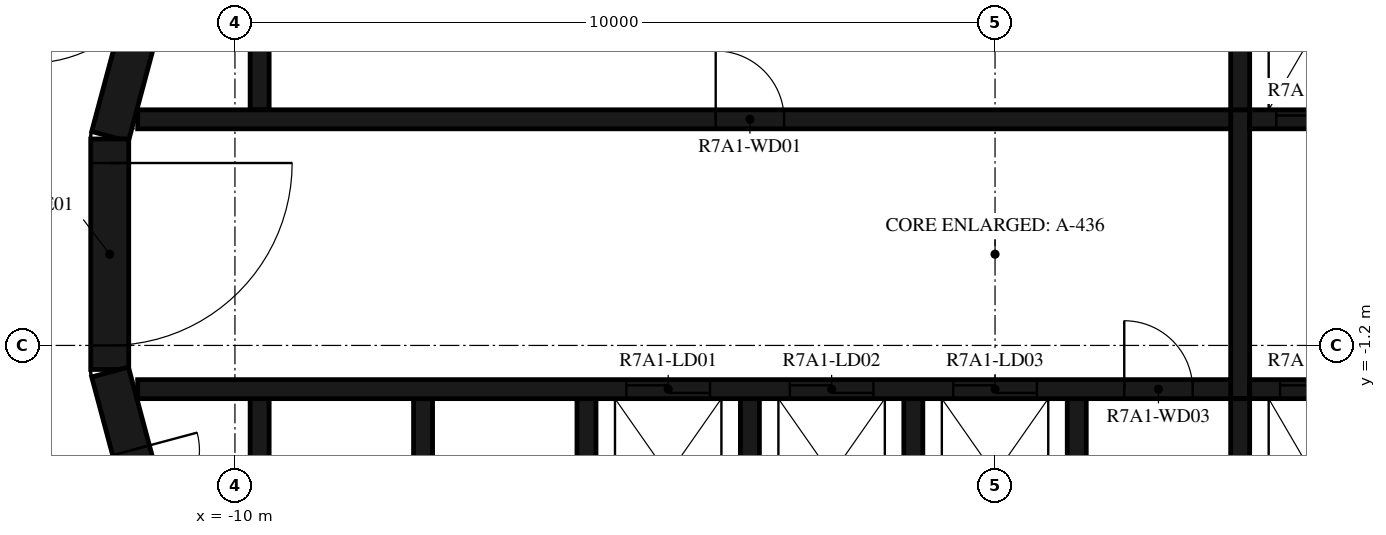
"""IFC4 building model, lengths in metres.
Left out: names, types, materials, properties, quantities, classifications, styles, units other than length and angle.
Written with IfcOpenShell. Run it as: python <this file> out.ifc"""

import sys

from ifc_helpers import new_model, si_unit, direction, frame, frame_2d, origin, place, context, subcontext, project, spatial, polyline, rectangle, outline, extrude, element, fill, save


model = new_model("IFC4")
c1 = context("Model", 3, precision=1e-05, world=origin(), true_north=direction((0.0, 1.0)))
c2 = subcontext(c1, "Body", "Model", "MODEL_VIEW")
j1 = project(units=[si_unit("LENGTHUNIT", "METRE"), si_unit("PLANEANGLEUNIT", "RADIAN")], contexts=[c1])
p1 = place(None, origin())
s1 = spatial("IfcSite", under=j1, at=p1, CompositionType="ELEMENT")
p2 = place(p1, origin())
s2 = spatial("IfcBuilding", under=s1, at=p2, CompositionType="ELEMENT")
p3 = place(p2, frame((0.0, 0.0, 266.9)))
s3 = spatial("IfcBuildingStorey", under=s2, at=p3, CompositionType="ELEMENT", Elevation=266.9)
p4 = place(p3, frame((-10.858, 4.479, 0.0), z_axis=(0.0, 0.0, 1.0), x_axis=(-0.258734743916, -0.965948410781, 0.0)))
e1 = element("IfcWall", 1, at=p4, inside=s3, PredefinedType="SHEAR", context=c2, shape_type="SweptSolid", body=[
    extrude(rectangle(XDim=3.033, YDim=0.5, at=frame_2d((1.516, 0.0))), origin(), (0.0, 0.0, 1.0), 3.12),
])
p5 = place(p3, frame((-11.647, 1.516, 0.0), z_axis=(0.0, 0.0, 1.0), x_axis=(0.0, -1.0, 0.0)))
e2 = element("IfcWall", 2, at=p5, inside=s3, PredefinedType="SHEAR", context=c2, shape_type="SweptSolid", body=[
    extrude(rectangle(XDim=3.033, YDim=0.5, at=frame_2d((1.516, 0.0))), origin(), (0.0, 0.0, 1.0), 3.12),
])
p6 = place(p5, frame((0.316, 0.0, 0.0)))
e3 = element("IfcOpeningElement", 3, at=p6, cuts=e2, PredefinedType="OPENING", context=c2, shape_type="SweptSolid", body=[
    extrude(rectangle(XDim=2.4, YDim=2.1, at=frame_2d((1.2, 1.05))), frame((0.0, 0.26, 0.0), z_axis=(0.0, -1.0, 0.0), x_axis=(1.0, 0.0, 0.0)), (0.0, 0.0, 1.0), 0.52),
])
p7 = place(p3, frame((-11.643, -1.55, 0.0), z_axis=(0.0, 0.0, 1.0), x_axis=(0.258734743916, -0.965948410781, 0.0)))
e4 = element("IfcWall", 4, at=p7, inside=s3, PredefinedType="SHEAR", context=c2, shape_type="SweptSolid", body=[
    extrude(rectangle(XDim=3.033, YDim=0.5, at=frame_2d((1.516, 0.0))), origin(), (0.0, 0.0, 1.0), 3.12),
])
p8 = place(p7, frame((1.066, 0.0, 0.0)))
e5 = element("IfcOpeningElement", 5, at=p8, cuts=e4, PredefinedType="OPENING", context=c2, shape_type="SweptSolid", body=[
    extrude(rectangle(XDim=0.9, YDim=2.1, at=frame_2d((0.45, 1.05))), frame((0.0, 0.26, 0.0), z_axis=(0.0, -1.0, 0.0), x_axis=(1.0, 0.0, 0.0)), (0.0, 0.0, 1.0), 0.52),
])
p9 = place(p3, origin())
e6 = element("IfcWall", 6, at=p9, inside=s3, PredefinedType="SHEAR", context=c2, shape_type="SweptSolid", body=[
    extrude(outline(polyline([(-9.8, 1.9), (-9.55, 1.9), (-9.55, 4.8), (3.1, 4.8), (3.1, 1.9), (3.35, 1.9), (3.35, 4.8), (5.25, 4.8), (5.25, 1.9), (5.5, 1.9), (5.5, 4.8), (7.4, 4.8), (7.4, 1.9), (7.65, 1.9), (7.65, 4.8), (9.55, 4.8), (9.55, 1.9), (9.8, 1.9), (9.8, 4.8), (9.8, 5.05), (-9.8, 5.05), (-9.8, 4.8), (-9.8, 1.9)])), origin(), (0.0, 0.0, 1.0), 3.12),
])
p10 = place(p3, origin())
e7 = element("IfcWall", 7, at=p10, inside=s3, PredefinedType="SHEAR", context=c2, shape_type="SweptSolid", body=[
    extrude(outline(polyline([(9.8, -5.05), (9.8, -4.8), (9.8, -1.9), (9.55, -1.9), (9.55, -4.8), (7.65, -4.8), (7.65, -1.9), (7.4, -1.9), (7.4, -4.8), (5.5, -4.8), (5.5, -1.9), (5.25, -1.9), (5.25, -4.8), (3.35, -4.8), (3.35, -1.9), (3.1, -1.9), (3.1, -4.8), (1.2, -4.8), (1.2, -1.9), (0.95, -1.9), (0.95, -4.8), (-0.95, -4.8), (-0.95, -1.9), (-1.2, -1.9), (-1.2, -4.8), (-3.1, -4.8), (-3.1, -1.9), (-3.35, -1.9), (-3.35, -4.8), (-5.25, -4.8), (-5.25, -1.9), (-5.5, -1.9), (-5.5, -4.8), (-7.4, -4.8), (-7.4, -1.9), (-7.65, -1.9), (-7.65, -4.8), (-9.55, -4.8), (-9.55, -1.9), (-9.8, -1.9), (-9.8, -4.8), (-9.8, -5.05), (9.8, -5.05)])), origin(), (0.0, 0.0, 1.0), 3.12),
])
p11 = place(p3, frame((-11.28, 1.775, 0.0), z_axis=(0.0, 0.0, 1.0), x_axis=(1.0, 0.0, 0.0)))
e8 = element("IfcWall", 8, at=p11, inside=s3, PredefinedType="SHEAR", context=c2, shape_type="SweptSolid", body=[
    extrude(rectangle(XDim=14.38, YDim=0.25, at=frame_2d((7.19, 0.0))), origin(), (0.0, 0.0, 1.0), 3.12),
])
p12 = place(p11, frame((7.605, 0.0, 0.0)))
e9 = element("IfcOpeningElement", 9, at=p12, cuts=e8, PredefinedType="OPENING", context=c2, shape_type="SweptSolid", body=[
    extrude(rectangle(XDim=0.9, YDim=2.1, at=frame_2d((0.45, 1.05))), frame((0.0, 0.135, 0.0), z_axis=(0.0, -1.0, 0.0), x_axis=(1.0, 0.0, 0.0)), (0.0, 0.0, 1.0), 0.27),
])
p13 = place(p3, frame((3.35, 1.775, 0.0), z_axis=(0.0, 0.0, 1.0), x_axis=(1.0, 0.0, 0.0)))
e10 = element("IfcWall", 10, at=p13, inside=s3, PredefinedType="SHEAR", context=c2, shape_type="SweptSolid", body=[
    extrude(rectangle(XDim=7.93, YDim=0.25, at=frame_2d((3.965, 0.0))), origin(), (0.0, 0.0, 1.0), 3.12),
])
p14 = place(p13, frame((0.35, 0.0, 0.0)))
e11 = element("IfcOpeningElement", 11, at=p14, cuts=e10, PredefinedType="OPENING", context=c2, shape_type="SweptSolid", body=[
    extrude(rectangle(XDim=1.2, YDim=2.4, at=frame_2d((0.6, 1.2))), frame((0.0, 0.135, 0.0), z_axis=(0.0, -1.0, 0.0), x_axis=(1.0, 0.0, 0.0)), (0.0, 0.0, 1.0), 0.27),
])
p15 = place(p13, frame((2.5, 0.0, 0.0)))
e12 = element("IfcOpeningElement", 12, at=p15, cuts=e10, PredefinedType="OPENING", context=c2, shape_type="SweptSolid", body=[
    extrude(rectangle(XDim=1.2, YDim=2.4, at=frame_2d((0.6, 1.2))), frame((0.0, 0.135, 0.0), z_axis=(0.0, -1.0, 0.0), x_axis=(1.0, 0.0, 0.0)), (0.0, 0.0, 1.0), 0.27),
])
p16 = place(p13, frame((4.8, 0.0, 0.0)))
e13 = element("IfcOpeningElement", 13, at=p16, cuts=e10, PredefinedType="OPENING", context=c2, shape_type="SweptSolid", body=[
    extrude(rectangle(XDim=0.9, YDim=2.1, at=frame_2d((0.45, 1.05))), frame((0.0, 0.135, 0.0), z_axis=(0.0, -1.0, 0.0), x_axis=(1.0, 0.0, 0.0)), (0.0, 0.0, 1.0), 0.27),
])
p17 = place(p3, frame((-11.28, -1.775, 0.0), z_axis=(0.0, 0.0, 1.0), x_axis=(1.0, 0.0, 0.0)))
e14 = element("IfcWall", 14, at=p17, inside=s3, PredefinedType="SHEAR", context=c2, shape_type="SweptSolid", body=[
    extrude(rectangle(XDim=14.38, YDim=0.25, at=frame_2d((7.19, 0.0))), origin(), (0.0, 0.0, 1.0), 3.12),
])
p18 = place(p17, frame((6.43, 0.0, 0.0)))
e15 = element("IfcOpeningElement", 15, at=p18, cuts=e14, PredefinedType="OPENING", context=c2, shape_type="SweptSolid", body=[
    extrude(rectangle(XDim=1.1, YDim=2.1, at=frame_2d((0.55, 1.05))), frame((0.0, 0.135, 0.0), z_axis=(0.0, -1.0, 0.0), x_axis=(1.0, 0.0, 0.0)), (0.0, 0.0, 1.0), 0.27),
])
p19 = place(p17, frame((8.58, 0.0, 0.0)))
e16 = element("IfcOpeningElement", 16, at=p19, cuts=e14, PredefinedType="OPENING", context=c2, shape_type="SweptSolid", body=[
    extrude(rectangle(XDim=1.1, YDim=2.1, at=frame_2d((0.55, 1.05))), frame((0.0, 0.135, 0.0), z_axis=(0.0, -1.0, 0.0), x_axis=(1.0, 0.0, 0.0)), (0.0, 0.0, 1.0), 0.27),
])
p20 = place(p17, frame((10.73, 0.0, 0.0)))
e17 = element("IfcOpeningElement", 17, at=p20, cuts=e14, PredefinedType="OPENING", context=c2, shape_type="SweptSolid", body=[
    extrude(rectangle(XDim=1.1, YDim=2.1, at=frame_2d((0.55, 1.05))), frame((0.0, 0.135, 0.0), z_axis=(0.0, -1.0, 0.0), x_axis=(1.0, 0.0, 0.0)), (0.0, 0.0, 1.0), 0.27),
])
p21 = place(p17, frame((12.98, 0.0, 0.0)))
e18 = element("IfcOpeningElement", 18, at=p21, cuts=e14, PredefinedType="OPENING", context=c2, shape_type="SweptSolid", body=[
    extrude(rectangle(XDim=0.9, YDim=2.1, at=frame_2d((0.45, 1.05))), frame((0.0, 0.135, 0.0), z_axis=(0.0, -1.0, 0.0), x_axis=(1.0, 0.0, 0.0)), (0.0, 0.0, 1.0), 0.27),
])
p22 = place(p3, frame((3.35, -1.775, 0.0), z_axis=(0.0, 0.0, 1.0), x_axis=(1.0, 0.0, 0.0)))
e19 = element("IfcWall", 19, at=p22, inside=s3, PredefinedType="SHEAR", context=c2, shape_type="SweptSolid", body=[
    extrude(rectangle(XDim=7.93, YDim=0.25, at=frame_2d((3.965, 0.0))), origin(), (0.0, 0.0, 1.0), 3.12),
])
p23 = place(p22, frame((0.4, 0.0, 0.0)))
e20 = element("IfcOpeningElement", 20, at=p23, cuts=e19, PredefinedType="OPENING", context=c2, shape_type="SweptSolid", body=[
    extrude(rectangle(XDim=1.1, YDim=2.4, at=frame_2d((0.55, 1.2))), frame((0.0, 0.135, 0.0), z_axis=(0.0, -1.0, 0.0), x_axis=(1.0, 0.0, 0.0)), (0.0, 0.0, 1.0), 0.27),
])
p24 = place(p22, frame((2.55, 0.0, 0.0)))
e21 = element("IfcOpeningElement", 21, at=p24, cuts=e19, PredefinedType="OPENING", context=c2, shape_type="SweptSolid", body=[
    extrude(rectangle(XDim=1.1, YDim=2.4, at=frame_2d((0.55, 1.2))), frame((0.0, 0.135, 0.0), z_axis=(0.0, -1.0, 0.0), x_axis=(1.0, 0.0, 0.0)), (0.0, 0.0, 1.0), 0.27),
])
p25 = place(p22, frame((4.7, 0.0, 0.0)))
e22 = element("IfcOpeningElement", 22, at=p25, cuts=e19, PredefinedType="OPENING", context=c2, shape_type="SweptSolid", body=[
    extrude(rectangle(XDim=1.1, YDim=2.4, at=frame_2d((0.55, 1.2))), frame((0.0, 0.135, 0.0), z_axis=(0.0, -1.0, 0.0), x_axis=(1.0, 0.0, 0.0)), (0.0, 0.0, 1.0), 0.27),
])
p26 = place(p3, frame((3.225, -1.9, 0.0), z_axis=(0.0, 0.0, 1.0), x_axis=(0.0, 1.0, 0.0)))
e23 = element("IfcWall", 23, at=p26, inside=s3, PredefinedType="SHEAR", context=c2, shape_type="SweptSolid", body=[
    extrude(rectangle(XDim=3.8, YDim=0.25, at=frame_2d((1.9, 0.0))), origin(), (0.0, 0.0, 1.0), 3.12),
])
p27 = place(p3, frame((-11.223, 8.154, 0.0), z_axis=(0.0, 0.0, 1.0), x_axis=(-0.358341090983, -0.93359073609, 0.0)))
e24 = element("IfcWall", 24, at=p27, inside=s3, PredefinedType="STANDARD", context=c2, shape_type="SweptSolid", body=[
    extrude(rectangle(XDim=7.181, YDim=0.2, at=frame_2d((3.59, 0.0))), origin(), (0.0, 0.0, 1.0), 3.12),
])
p28 = place(p27, frame((4.114, 0.0, 0.0)))
e25 = element("IfcOpeningElement", 25, at=p28, cuts=e24, PredefinedType="OPENING", context=c2, shape_type="SweptSolid", body=[
    extrude(rectangle(XDim=1.8, YDim=2.1, at=frame_2d((0.9, 1.05))), frame((0.0, 0.11, 0.0), z_axis=(0.0, -1.0, 0.0), x_axis=(1.0, 0.0, 0.0)), (0.0, 0.0, 1.0), 0.22),
])
p29 = place(p6, origin())
e26 = element("IfcDoor", 26, at=p29, inside=s3, OperationType="DOUBLE_DOOR_SINGLE_SWING", PredefinedType="DOOR", context=c2, shape_type="SweptSolid", body=[
    extrude(rectangle(XDim=2.4, YDim=2.1, at=frame_2d((1.2, 1.05))), frame((0.0, 0.025, 0.0), z_axis=(0.0, -1.0, 0.0), x_axis=(1.0, 0.0, 0.0)), (0.0, 0.0, 1.0), 0.05),
])
fill(e3, e26)
p30 = place(p14, origin())
e27 = element("IfcDoor", 27, at=p30, inside=s3, OperationType="DOUBLE_DOOR_SLIDING", PredefinedType="DOOR", context=c2, shape_type="SweptSolid", body=[
    extrude(rectangle(XDim=1.2, YDim=2.4, at=frame_2d((0.6, 1.2))), frame((0.0, 0.025, 0.0), z_axis=(0.0, -1.0, 0.0), x_axis=(1.0, 0.0, 0.0)), (0.0, 0.0, 1.0), 0.05),
])
fill(e11, e27)
p31 = place(p18, origin())
e28 = element("IfcDoor", 28, at=p31, inside=s3, OperationType="DOUBLE_DOOR_SLIDING", PredefinedType="DOOR", context=c2, shape_type="SweptSolid", body=[
    extrude(rectangle(XDim=1.1, YDim=2.1, at=frame_2d((0.55, 1.05))), frame((0.0, 0.025, 0.0), z_axis=(0.0, -1.0, 0.0), x_axis=(1.0, 0.0, 0.0)), (0.0, 0.0, 1.0), 0.05),
])
fill(e15, e28)
p32 = place(p19, origin())
e29 = element("IfcDoor", 29, at=p32, inside=s3, OperationType="DOUBLE_DOOR_SLIDING", PredefinedType="DOOR", context=c2, shape_type="SweptSolid", body=[
    extrude(rectangle(XDim=1.1, YDim=2.1, at=frame_2d((0.55, 1.05))), frame((0.0, 0.025, 0.0), z_axis=(0.0, -1.0, 0.0), x_axis=(1.0, 0.0, 0.0)), (0.0, 0.0, 1.0), 0.05),
])
fill(e16, e29)
p33 = place(p20, origin())
e30 = element("IfcDoor", 30, at=p33, inside=s3, OperationType="DOUBLE_DOOR_SLIDING", PredefinedType="DOOR", context=c2, shape_type="SweptSolid", body=[
    extrude(rectangle(XDim=1.1, YDim=2.1, at=frame_2d((0.55, 1.05))), frame((0.0, 0.025, 0.0), z_axis=(0.0, -1.0, 0.0), x_axis=(1.0, 0.0, 0.0)), (0.0, 0.0, 1.0), 0.05),
])
fill(e17, e30)
p34 = place(p23, origin())
e31 = element("IfcDoor", 31, at=p34, inside=s3, OperationType="DOUBLE_DOOR_SLIDING", PredefinedType="DOOR", context=c2, shape_type="SweptSolid", body=[
    extrude(rectangle(XDim=1.1, YDim=2.4, at=frame_2d((0.55, 1.2))), frame((0.0, 0.025, 0.0), z_axis=(0.0, -1.0, 0.0), x_axis=(1.0, 0.0, 0.0)), (0.0, 0.0, 1.0), 0.05),
])
fill(e20, e31)
p35 = place(p12, origin())
e32 = element("IfcDoor", 32, at=p35, inside=s3, OperationType="SINGLE_SWING_LEFT", PredefinedType="DOOR", context=c2, shape_type="SweptSolid", body=[
    extrude(rectangle(XDim=0.9, YDim=2.1, at=frame_2d((0.45, 1.05))), frame((0.0, 0.025, 0.0), z_axis=(0.0, -1.0, 0.0), x_axis=(1.0, 0.0, 0.0)), (0.0, 0.0, 1.0), 0.05),
])
fill(e9, e32)
p36 = place(p21, origin())
e33 = element("IfcDoor", 33, at=p36, inside=s3, OperationType="SINGLE_SWING_LEFT", PredefinedType="DOOR", context=c2, shape_type="SweptSolid", body=[
    extrude(rectangle(XDim=0.9, YDim=2.1, at=frame_2d((0.45, 1.05))), frame((0.0, 0.025, 0.0), z_axis=(0.0, -1.0, 0.0), x_axis=(1.0, 0.0, 0.0)), (0.0, 0.0, 1.0), 0.05),
])
fill(e18, e33)
p37 = place(p8, origin())
e34 = element("IfcDoor", 34, at=p37, inside=s3, OperationType="SINGLE_SWING_RIGHT", PredefinedType="DOOR", context=c2, shape_type="SweptSolid", body=[
    extrude(rectangle(XDim=0.9, YDim=2.1, at=frame_2d((0.45, 1.05))), frame((0.0, 0.025, 0.0), z_axis=(0.0, -1.0, 0.0), x_axis=(1.0, 0.0, 0.0)), (0.0, 0.0, 1.0), 0.05),
])
fill(e5, e34)
save(model, sys.argv[1])
